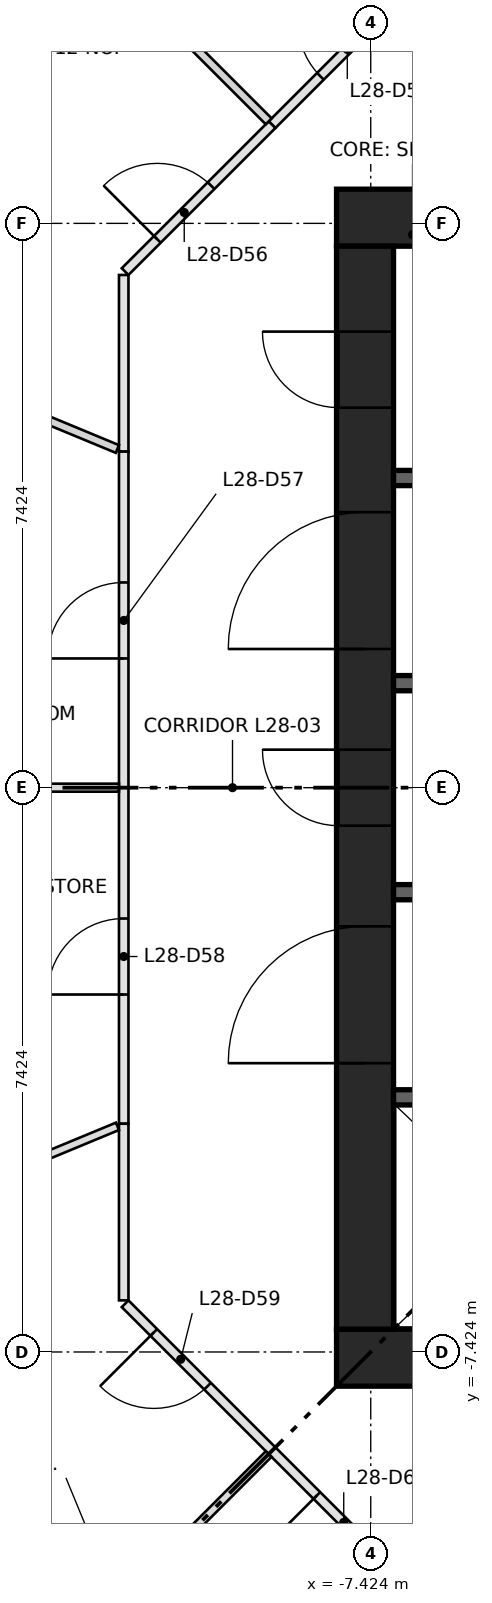
"""IFC4 building model, lengths in metres.
Left out: names, types, materials, properties, quantities, classifications, styles, units other than length and angle.
Written with IfcOpenShell. Run it as: python <this file> out.ifc"""

import sys

from ifc_helpers import new_model, si_unit, direction, frame, frame_2d, origin, place, context, subcontext, project, spatial, rectangle, extrude, element, fill, save


model = new_model("IFC4")
c1 = context("Model", 3, precision=1e-05, world=origin(), true_north=direction((0.0, 1.0)))
c2 = subcontext(c1, "Body", "Model", "MODEL_VIEW")
j1 = project(units=[si_unit("LENGTHUNIT", "METRE"), si_unit("PLANEANGLEUNIT", "RADIAN")], contexts=[c1])
p1 = place(None, origin())
s1 = spatial("IfcSite", under=j1, at=p1, CompositionType="ELEMENT")
p2 = place(p1, origin())
s2 = spatial("IfcBuilding", under=s1, at=p2, CompositionType="ELEMENT")
p3 = place(p2, frame((0.0, 0.0, 109.25)))
s3 = spatial("IfcBuildingStorey", under=s2, at=p3, CompositionType="ELEMENT", Elevation=109.25)
for number, where, z_axis, x_axis in (
    (1, (-7.874, -7.499, 0.0), (0.0, 0.0, 1.0), (1.0, 0.0, 0.0)),
    (2, (-7.874, 7.499, 0.0), (0.0, 0.0, 1.0), (1.0, 0.0, 0.0)),
):
    element("IfcWall", number, at=place(p3, frame(where, z_axis=z_axis, x_axis=x_axis)), inside=s3, PredefinedType="SHEAR", context=c2, shape_type="SweptSolid", body=[
        extrude(rectangle(XDim=15.748, YDim=0.75, at=frame_2d((7.874, 0.0))), origin(), (0.0, 0.0, 1.0), 3.65),
    ])
p4 = place(p3, frame((-7.499, -7.124, 0.0), z_axis=(0.0, 0.0, 1.0), x_axis=(0.0, 1.0, 0.0)))
e3 = element("IfcWall", 3, at=p4, inside=s3, PredefinedType="SHEAR", context=c2, shape_type="SweptSolid", body=[
    extrude(rectangle(XDim=14.248, YDim=0.75, at=frame_2d((7.124, 0.0))), origin(), (0.0, 0.0, 1.0), 3.65),
])
p5 = place(p4, frame((6.624, 0.0, 0.0)))
e4 = element("IfcOpeningElement", 4, at=p5, cuts=e3, PredefinedType="OPENING", context=c2, shape_type="SweptSolid", body=[
    extrude(rectangle(XDim=1.0, YDim=2.1, at=frame_2d((0.5, 1.05))), frame((0.0, 0.385, 0.0), z_axis=(0.0, -1.0, 0.0), x_axis=(1.0, 0.0, 0.0)), (0.0, 0.0, 1.0), 0.77),
])
p6 = place(p4, frame((3.5, 0.0, 0.0)))
e5 = element("IfcOpeningElement", 5, at=p6, cuts=e3, PredefinedType="OPENING", context=c2, shape_type="SweptSolid", body=[
    extrude(rectangle(XDim=1.8, YDim=2.1, at=frame_2d((0.9, 1.05))), frame((0.0, 0.385, 0.0), z_axis=(0.0, -1.0, 0.0), x_axis=(1.0, 0.0, 0.0)), (0.0, 0.0, 1.0), 0.77),
])
p7 = place(p4, frame((8.948, 0.0, 0.0)))
e6 = element("IfcOpeningElement", 6, at=p7, cuts=e3, PredefinedType="OPENING", context=c2, shape_type="SweptSolid", body=[
    extrude(rectangle(XDim=1.8, YDim=2.1, at=frame_2d((0.9, 1.05))), frame((0.0, 0.385, 0.0), z_axis=(0.0, -1.0, 0.0), x_axis=(1.0, 0.0, 0.0)), (0.0, 0.0, 1.0), 0.77),
])
p8 = place(p4, frame((12.124, 0.0, 0.0)))
e7 = element("IfcOpeningElement", 7, at=p8, cuts=e3, PredefinedType="OPENING", context=c2, shape_type="SweptSolid", body=[
    extrude(rectangle(XDim=1.0, YDim=2.1, at=frame_2d((0.5, 1.05))), frame((0.0, 0.385, 0.0), z_axis=(0.0, -1.0, 0.0), x_axis=(1.0, 0.0, 0.0)), (0.0, 0.0, 1.0), 0.77),
])
p9 = place(p3, frame((-7.124, -4.074, 0.0), z_axis=(0.0, 0.0, 1.0), x_axis=(1.0, 0.0, 0.0)))
e8 = element("IfcWall", 8, at=p9, inside=s3, PredefinedType="SHEAR", context=c2, shape_type="SweptSolid", body=[
    extrude(rectangle(XDim=14.248, YDim=0.2, at=frame_2d((7.124, 0.0))), origin(), (0.0, 0.0, 1.0), 3.3),
])
p10 = place(p9, frame((1.069, 0.0, 0.0)))
e9 = element("IfcOpeningElement", 9, at=p10, cuts=e8, PredefinedType="OPENING", context=c2, shape_type="SweptSolid", body=[
    extrude(rectangle(XDim=1.1, YDim=2.1, at=frame_2d((0.55, 1.05))), frame((0.0, 0.11, 0.0), z_axis=(0.0, -1.0, 0.0), x_axis=(1.0, 0.0, 0.0)), (0.0, 0.0, 1.0), 0.22),
])
p11 = place(p9, frame((4.206, 0.0, 0.0)))
e10 = element("IfcOpeningElement", 10, at=p11, cuts=e8, PredefinedType="OPENING", context=c2, shape_type="SweptSolid", body=[
    extrude(rectangle(XDim=1.1, YDim=2.1, at=frame_2d((0.55, 1.05))), frame((0.0, 0.11, 0.0), z_axis=(0.0, -1.0, 0.0), x_axis=(1.0, 0.0, 0.0)), (0.0, 0.0, 1.0), 0.22),
])
p12 = place(p9, frame((6.808, 0.0, 0.0)))
e11 = element("IfcOpeningElement", 11, at=p12, cuts=e8, PredefinedType="OPENING", context=c2, shape_type="SweptSolid", body=[
    extrude(rectangle(XDim=1.0, YDim=2.1, at=frame_2d((0.5, 1.05))), frame((0.0, 0.11, 0.0), z_axis=(0.0, -1.0, 0.0), x_axis=(1.0, 0.0, 0.0)), (0.0, 0.0, 1.0), 0.22),
])
p13 = place(p9, frame((8.777, 0.0, 0.0)))
e12 = element("IfcOpeningElement", 12, at=p13, cuts=e8, PredefinedType="OPENING", context=c2, shape_type="SweptSolid", body=[
    extrude(rectangle(XDim=1.0, YDim=2.1, at=frame_2d((0.5, 1.05))), frame((0.0, 0.11, 0.0), z_axis=(0.0, -1.0, 0.0), x_axis=(1.0, 0.0, 0.0)), (0.0, 0.0, 1.0), 0.22),
])
p14 = place(p9, frame((10.745, 0.0, 0.0)))
e13 = element("IfcOpeningElement", 13, at=p14, cuts=e8, PredefinedType="OPENING", context=c2, shape_type="SweptSolid", body=[
    extrude(rectangle(XDim=1.0, YDim=2.1, at=frame_2d((0.5, 1.05))), frame((0.0, 0.11, 0.0), z_axis=(0.0, -1.0, 0.0), x_axis=(1.0, 0.0, 0.0)), (0.0, 0.0, 1.0), 0.22),
])
p15 = place(p9, frame((12.714, 0.0, 0.0)))
e14 = element("IfcOpeningElement", 14, at=p15, cuts=e8, PredefinedType="OPENING", context=c2, shape_type="SweptSolid", body=[
    extrude(rectangle(XDim=1.0, YDim=2.1, at=frame_2d((0.5, 1.05))), frame((0.0, 0.11, 0.0), z_axis=(0.0, -1.0, 0.0), x_axis=(1.0, 0.0, 0.0)), (0.0, 0.0, 1.0), 0.22),
])
p16 = place(p3, frame((-7.124, 4.074, 0.0), z_axis=(0.0, 0.0, 1.0), x_axis=(1.0, 0.0, 0.0)))
e15 = element("IfcWall", 15, at=p16, inside=s3, PredefinedType="SHEAR", context=c2, shape_type="SweptSolid", body=[
    extrude(rectangle(XDim=7.124, YDim=0.2, at=frame_2d((3.562, 0.0))), origin(), (0.0, 0.0, 1.0), 3.3),
])
for number, where, z_axis, x_axis in (
    (16, (-7.124, -1.375, 0.0), (0.0, 0.0, 1.0), (1.0, 0.0, 0.0)),
    (17, (-7.124, 1.375, 0.0), (0.0, 0.0, 1.0), (1.0, 0.0, 0.0)),
):
    element("IfcWall", number, at=place(p3, frame(where, z_axis=z_axis, x_axis=x_axis)), inside=s3, PredefinedType="SHEAR", context=c2, shape_type="SweptSolid", body=[
        extrude(rectangle(XDim=2.75, YDim=0.2, at=frame_2d((1.375, 0.0))), origin(), (0.0, 0.0, 1.0), 3.3),
    ])
p17 = place(p3, frame((-8.722, 8.722, 0.0), z_axis=(0.0, 0.0, 1.0), x_axis=(0.707062130741, 0.707151428813, 0.0)))
e18 = element("IfcWall", 18, at=p17, inside=s3, PredefinedType="PARTITIONING", context=c2, shape_type="SweptSolid", body=[
    extrude(rectangle(XDim=2.734, YDim=0.125, at=frame_2d((1.367, 0.0))), origin(), (0.0, 0.0, 1.0), 3.3),
])
p18 = place(p17, frame((0.9, 0.0, 0.0)))
e19 = element("IfcOpeningElement", 19, at=p18, cuts=e18, PredefinedType="OPENING", context=c2, shape_type="SweptSolid", body=[
    extrude(rectangle(XDim=1.0, YDim=2.1, at=frame_2d((0.5, 1.05))), frame((0.0, 0.073, 0.0), z_axis=(0.0, -1.0, 0.0), x_axis=(1.0, 0.0, 0.0)), (0.0, 0.0, 1.0), 0.145),
])
p19 = place(p3, frame((-10.674, 4.421, 0.0), z_axis=(0.0, 0.0, 1.0), x_axis=(0.0, 1.0, 0.0)))
e20 = element("IfcWall", 20, at=p19, inside=s3, PredefinedType="PARTITIONING", context=c2, shape_type="SweptSolid", body=[
    extrude(rectangle(XDim=2.324, YDim=0.125, at=frame_2d((1.162, 0.0))), origin(), (0.0, 0.0, 1.0), 3.3),
])
p20 = place(p3, frame((-10.656, 6.789, 0.0), z_axis=(0.0, 0.0, 1.0), x_axis=(0.707151428813, 0.707062130741, 0.0)))
e21 = element("IfcWall", 21, at=p20, inside=s3, PredefinedType="PARTITIONING", context=c2, shape_type="SweptSolid", body=[
    extrude(rectangle(XDim=2.734, YDim=0.125, at=frame_2d((1.367, 0.0))), origin(), (0.0, 0.0, 1.0), 3.3),
])
p21 = place(p20, frame((0.6, 0.0, 0.0)))
e22 = element("IfcOpeningElement", 22, at=p21, cuts=e21, PredefinedType="OPENING", context=c2, shape_type="SweptSolid", body=[
    extrude(rectangle(XDim=1.0, YDim=2.1, at=frame_2d((0.5, 1.05))), frame((0.0, 0.073, 0.0), z_axis=(0.0, -1.0, 0.0), x_axis=(1.0, 0.0, 0.0)), (0.0, 0.0, 1.0), 0.145),
])
p22 = place(p3, frame((-10.674, 0.0, 0.0), z_axis=(0.0, 0.0, 1.0), x_axis=(0.0, 1.0, 0.0)))
e23 = element("IfcWall", 23, at=p22, inside=s3, PredefinedType="PARTITIONING", context=c2, shape_type="SweptSolid", body=[
    extrude(rectangle(XDim=4.421, YDim=0.125, at=frame_2d((2.211, 0.0))), origin(), (0.0, 0.0, 1.0), 3.3),
])
p23 = place(p22, frame((1.7, 0.0, 0.0)))
e24 = element("IfcOpeningElement", 24, at=p23, cuts=e23, PredefinedType="OPENING", context=c2, shape_type="SweptSolid", body=[
    extrude(rectangle(XDim=1.0, YDim=2.1, at=frame_2d((0.5, 1.05))), frame((0.0, 0.073, 0.0), z_axis=(0.0, -1.0, 0.0), x_axis=(1.0, 0.0, 0.0)), (0.0, 0.0, 1.0), 0.145),
])
p24 = place(p3, frame((-10.674, -4.421, 0.0), z_axis=(0.0, 0.0, 1.0), x_axis=(0.0, 1.0, 0.0)))
e25 = element("IfcWall", 25, at=p24, inside=s3, PredefinedType="PARTITIONING", context=c2, shape_type="SweptSolid", body=[
    extrude(rectangle(XDim=4.421, YDim=0.125, at=frame_2d((2.211, 0.0))), origin(), (0.0, 0.0, 1.0), 3.3),
])
p25 = place(p24, frame((1.7, 0.0, 0.0)))
e26 = element("IfcOpeningElement", 26, at=p25, cuts=e25, PredefinedType="OPENING", context=c2, shape_type="SweptSolid", body=[
    extrude(rectangle(XDim=1.0, YDim=2.1, at=frame_2d((0.5, 1.05))), frame((0.0, 0.073, 0.0), z_axis=(0.0, -1.0, 0.0), x_axis=(1.0, 0.0, 0.0)), (0.0, 0.0, 1.0), 0.145),
])
p26 = place(p3, frame((-10.674, -6.745, 0.0), z_axis=(0.0, 0.0, 1.0), x_axis=(0.0, 1.0, 0.0)))
e27 = element("IfcWall", 27, at=p26, inside=s3, PredefinedType="PARTITIONING", context=c2, shape_type="SweptSolid", body=[
    extrude(rectangle(XDim=2.324, YDim=0.125, at=frame_2d((1.162, 0.0))), origin(), (0.0, 0.0, 1.0), 3.3),
])
p27 = place(p3, frame((-8.722, -8.722, 0.0), z_axis=(0.0, 0.0, 1.0), x_axis=(-0.707151428813, 0.707062130741, 0.0)))
e28 = element("IfcWall", 28, at=p27, inside=s3, PredefinedType="PARTITIONING", context=c2, shape_type="SweptSolid", body=[
    extrude(rectangle(XDim=2.734, YDim=0.125, at=frame_2d((1.367, 0.0))), origin(), (0.0, 0.0, 1.0), 3.3),
])
p28 = place(p27, frame((1.2, 0.0, 0.0)))
e29 = element("IfcOpeningElement", 29, at=p28, cuts=e28, PredefinedType="OPENING", context=c2, shape_type="SweptSolid", body=[
    extrude(rectangle(XDim=1.0, YDim=2.1, at=frame_2d((0.5, 1.05))), frame((0.0, 0.073, 0.0), z_axis=(0.0, -1.0, 0.0), x_axis=(1.0, 0.0, 0.0)), (0.0, 0.0, 1.0), 0.145),
])
p29 = place(p3, frame((-6.789, -10.656, 0.0), z_axis=(0.0, 0.0, 1.0), x_axis=(-0.707062130741, 0.707151428813, 0.0)))
e30 = element("IfcWall", 30, at=p29, inside=s3, PredefinedType="PARTITIONING", context=c2, shape_type="SweptSolid", body=[
    extrude(rectangle(XDim=2.734, YDim=0.125, at=frame_2d((1.367, 0.0))), origin(), (0.0, 0.0, 1.0), 3.3),
])
p30 = place(p29, frame((0.9, 0.0, 0.0)))
e31 = element("IfcOpeningElement", 31, at=p30, cuts=e30, PredefinedType="OPENING", context=c2, shape_type="SweptSolid", body=[
    extrude(rectangle(XDim=1.0, YDim=2.1, at=frame_2d((0.5, 1.05))), frame((0.0, 0.073, 0.0), z_axis=(0.0, -1.0, 0.0), x_axis=(1.0, 0.0, 0.0)), (0.0, 0.0, 1.0), 0.145),
])
p31 = place(p3, frame((-8.767, 8.767, 0.0), z_axis=(0.0, 0.0, 1.0), x_axis=(-0.707106781187, 0.707106781187, 0.0)))
e32 = element("IfcWall", 32, at=p31, inside=s3, PredefinedType="PARTITIONING", context=c2, shape_type="SweptSolid", body=[
    extrude(rectangle(XDim=5.602, YDim=0.11, at=frame_2d((2.801, 0.0))), origin(), (0.0, 0.0, 1.0), 3.3),
])
p32 = place(p3, frame((-10.758, 4.456, 0.0), z_axis=(0.0, 0.0, 1.0), x_axis=(-0.923844847366, 0.382767158983, 0.0)))
e33 = element("IfcWall", 33, at=p32, inside=s3, PredefinedType="PARTITIONING", context=c2, shape_type="SweptSolid", body=[
    extrude(rectangle(XDim=1.886, YDim=0.11, at=frame_2d((0.943, 0.0))), origin(), (0.0, 0.0, 1.0), 3.3),
])
p33 = place(p3, frame((-10.737, 0.0, 0.0), z_axis=(0.0, 0.0, 1.0), x_axis=(-1.0, 0.0, 0.0)))
e34 = element("IfcWall", 34, at=p33, inside=s3, PredefinedType="PARTITIONING", context=c2, shape_type="SweptSolid", body=[
    extrude(rectangle(XDim=2.735, YDim=0.105, at=frame_2d((1.367, 0.0))), origin(), (0.0, 0.0, 1.0), 3.3),
])
p34 = place(p3, frame((-10.757, -4.456, 0.0), z_axis=(0.0, 0.0, 1.0), x_axis=(-0.923874914803, -0.382694580309, 0.0)))
e35 = element("IfcWall", 35, at=p34, inside=s3, PredefinedType="PARTITIONING", context=c2, shape_type="SweptSolid", body=[
    extrude(rectangle(XDim=1.887, YDim=0.105, at=frame_2d((0.943, 0.0))), origin(), (0.0, 0.0, 1.0), 3.3),
])
p35 = place(p3, frame((-12.728, -12.728, 0.0), z_axis=(0.0, 0.0, 1.0), x_axis=(0.707106781187, 0.707106781187, 0.0)))
e36 = element("IfcWall", 36, at=p35, inside=s3, PredefinedType="PARTITIONING", context=c2, shape_type="SweptSolid", body=[
    extrude(rectangle(XDim=5.602, YDim=0.105, at=frame_2d((2.801, 0.0))), origin(), (0.0, 0.0, 1.0), 3.3),
])
p36 = place(p5, origin())
e37 = element("IfcDoor", 37, at=p36, inside=s3, OperationType="SINGLE_SWING_RIGHT", PredefinedType="DOOR", context=c2, shape_type="SweptSolid", body=[
    extrude(rectangle(XDim=1.0, YDim=2.1, at=frame_2d((0.5, 1.05))), frame((0.0, 0.375, 0.0), z_axis=(0.0, -1.0, 0.0), x_axis=(1.0, 0.0, 0.0)), (0.0, 0.0, 1.0), 0.05),
])
fill(e4, e37)
p37 = place(p6, origin())
e38 = element("IfcDoor", 38, at=p37, inside=s3, OperationType="DOUBLE_DOOR_SINGLE_SWING", PredefinedType="DOOR", context=c2, shape_type="SweptSolid", body=[
    extrude(rectangle(XDim=1.8, YDim=2.1, at=frame_2d((0.9, 1.05))), frame((0.0, 0.025, 0.0), z_axis=(0.0, -1.0, 0.0), x_axis=(1.0, 0.0, 0.0)), (0.0, 0.0, 1.0), 0.05),
])
fill(e5, e38)
p38 = place(p7, origin())
e39 = element("IfcDoor", 39, at=p38, inside=s3, OperationType="DOUBLE_DOOR_SINGLE_SWING", PredefinedType="DOOR", context=c2, shape_type="SweptSolid", body=[
    extrude(rectangle(XDim=1.8, YDim=2.1, at=frame_2d((0.9, 1.05))), frame((0.0, 0.025, 0.0), z_axis=(0.0, -1.0, 0.0), x_axis=(1.0, 0.0, 0.0)), (0.0, 0.0, 1.0), 0.05),
])
fill(e6, e39)
p39 = place(p8, origin())
e40 = element("IfcDoor", 40, at=p39, inside=s3, OperationType="SINGLE_SWING_RIGHT", PredefinedType="DOOR", context=c2, shape_type="SweptSolid", body=[
    extrude(rectangle(XDim=1.0, YDim=2.1, at=frame_2d((0.5, 1.05))), frame((0.0, 0.375, 0.0), z_axis=(0.0, -1.0, 0.0), x_axis=(1.0, 0.0, 0.0)), (0.0, 0.0, 1.0), 0.05),
])
fill(e7, e40)
p40 = place(p18, origin())
e41 = element("IfcDoor", 41, at=p40, inside=s3, OperationType="SINGLE_SWING_RIGHT", PredefinedType="DOOR", context=c2, shape_type="SweptSolid", body=[
    extrude(rectangle(XDim=1.0, YDim=2.1, at=frame_2d((0.5, 1.05))), frame((0.0, 0.025, 0.0), z_axis=(0.0, -1.0, 0.0), x_axis=(1.0, 0.0, 0.0)), (0.0, 0.0, 1.0), 0.05),
])
fill(e19, e41)
p41 = place(p21, origin())
e42 = element("IfcDoor", 42, at=p41, inside=s3, OperationType="SINGLE_SWING_LEFT", PredefinedType="DOOR", context=c2, shape_type="SweptSolid", body=[
    extrude(rectangle(XDim=1.0, YDim=2.1, at=frame_2d((0.5, 1.05))), frame((0.0, 0.025, 0.0), z_axis=(0.0, -1.0, 0.0), x_axis=(1.0, 0.0, 0.0)), (0.0, 0.0, 1.0), 0.05),
])
fill(e22, e42)
p42 = place(p23, origin())
e43 = element("IfcDoor", 43, at=p42, inside=s3, OperationType="SINGLE_SWING_LEFT", PredefinedType="DOOR", context=c2, shape_type="SweptSolid", body=[
    extrude(rectangle(XDim=1.0, YDim=2.1, at=frame_2d((0.5, 1.05))), frame((0.0, 0.025, 0.0), z_axis=(0.0, -1.0, 0.0), x_axis=(1.0, 0.0, 0.0)), (0.0, 0.0, 1.0), 0.05),
])
fill(e24, e43)
p43 = place(p25, origin())
e44 = element("IfcDoor", 44, at=p43, inside=s3, OperationType="SINGLE_SWING_LEFT", PredefinedType="DOOR", context=c2, shape_type="SweptSolid", body=[
    extrude(rectangle(XDim=1.0, YDim=2.1, at=frame_2d((0.5, 1.05))), frame((0.0, 0.025, 0.0), z_axis=(0.0, -1.0, 0.0), x_axis=(1.0, 0.0, 0.0)), (0.0, 0.0, 1.0), 0.05),
])
fill(e26, e44)
p44 = place(p28, origin())
e45 = element("IfcDoor", 45, at=p44, inside=s3, OperationType="SINGLE_SWING_RIGHT", PredefinedType="DOOR", context=c2, shape_type="SweptSolid", body=[
    extrude(rectangle(XDim=1.0, YDim=2.1, at=frame_2d((0.5, 1.05))), frame((0.0, 0.025, 0.0), z_axis=(0.0, -1.0, 0.0), x_axis=(1.0, 0.0, 0.0)), (0.0, 0.0, 1.0), 0.05),
])
fill(e29, e45)
p45 = place(p30, origin())
e46 = element("IfcDoor", 46, at=p45, inside=s3, OperationType="SINGLE_SWING_RIGHT", PredefinedType="DOOR", context=c2, shape_type="SweptSolid", body=[
    extrude(rectangle(XDim=1.0, YDim=2.1, at=frame_2d((0.5, 1.05))), frame((0.0, 0.025, 0.0), z_axis=(0.0, -1.0, 0.0), x_axis=(1.0, 0.0, 0.0)), (0.0, 0.0, 1.0), 0.05),
])
fill(e31, e46)
save(model, sys.argv[1])
